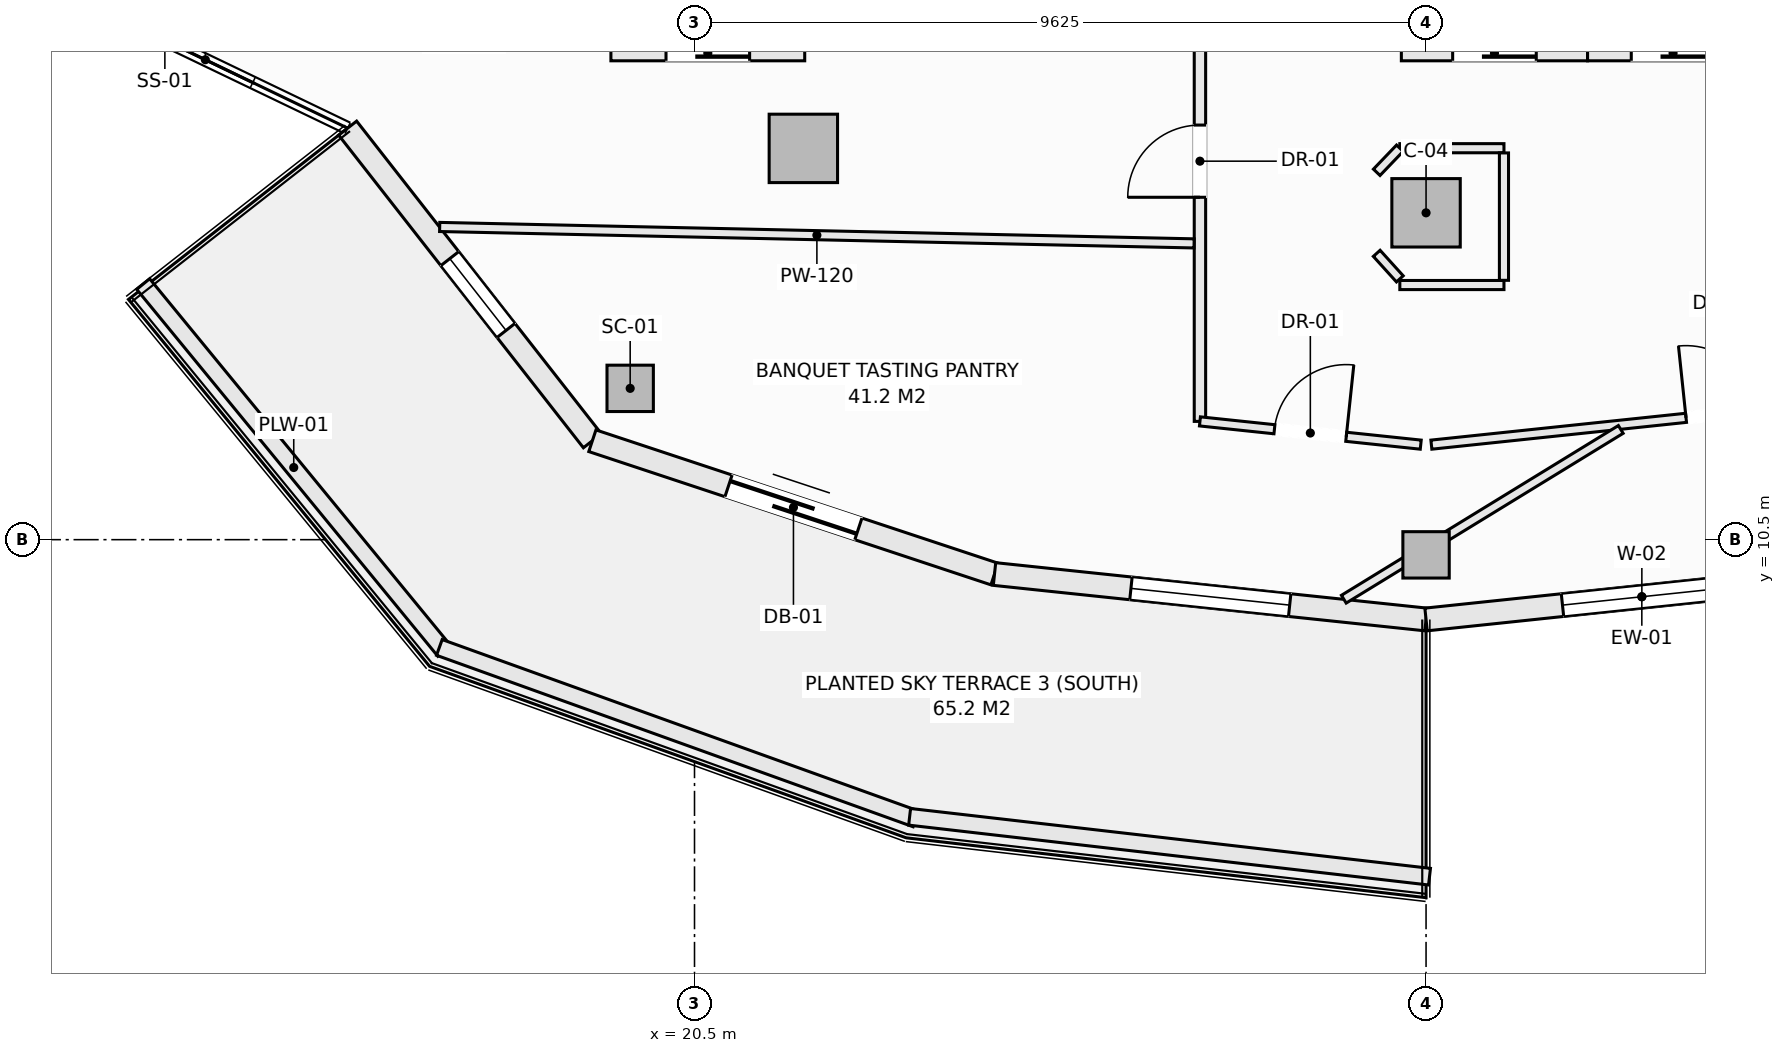
"""IFC4 building model, lengths in metres.
Left out: names, types, materials, properties, quantities, classifications, styles, units other than length and angle.
Written with IfcOpenShell. Run it as: python <this file> out.ifc"""

import sys

from ifc_helpers import new_model, si_unit, direction, frame, frame_2d, origin, origin_2d, place, context, subcontext, project, spatial, rectangle, hollow_rectangle, extrude, element, fill, save


model = new_model("IFC4")
c1 = context("Model", 3, precision=1e-05, world=origin(), true_north=direction((0.0, 1.0)))
c2 = subcontext(c1, "Body", "Model", "MODEL_VIEW")
j1 = project(units=[si_unit("LENGTHUNIT", "METRE"), si_unit("PLANEANGLEUNIT", "RADIAN")], contexts=[c1])
p1 = place(None, origin())
s1 = spatial("IfcSite", under=j1, at=p1, CompositionType="ELEMENT")
p2 = place(p1, origin())
s2 = spatial("IfcBuilding", under=s1, at=p2, CompositionType="ELEMENT")
p3 = place(p2, frame((0.0, 0.0, 149.5)))
s3 = spatial("IfcBuildingStorey", under=s2, at=p3, CompositionType="ELEMENT", Elevation=149.5)
for number, where, z_axis, x_axis in (
    (1, (19.654, 12.49, -0.27), (0.0, 0.0, 1.0), (1.0, 0.0, 0.0)),
    (2, (30.125, 10.3, -0.27), (0.0, 0.0, 1.0), (1.0, 0.0, 0.0)),
):
    element("IfcColumn", number, at=place(p3, frame(where, z_axis=z_axis, x_axis=x_axis)), inside=s3, PredefinedType="COLUMN", context=c2, shape_type="SweptSolid", body=[
        extrude(hollow_rectangle(XDim=0.61, YDim=0.61, WallThickness=0.025, at=origin_2d()), origin(), (0.0, 0.0, 1.0), 3.4),
    ])
for number, where, z_axis, x_axis in (
    (3, (21.932, 15.648, -0.27), (0.0, 0.0, 1.0), (1.0, 0.0, 0.0)),
    (4, (30.125, 14.8, -0.27), (0.0, 0.0, 1.0), (1.0, 0.0, 0.0)),
):
    element("IfcColumn", number, at=place(p3, frame(where, z_axis=z_axis, x_axis=x_axis)), inside=s3, PredefinedType="COLUMN", context=c2, shape_type="SweptSolid", body=[
        extrude(rectangle(XDim=0.9, YDim=0.9, at=origin_2d()), origin(), (0.0, 0.0, 1.0), 3.4),
    ])
p4 = place(p3, frame((15.937, 15.914, 0.0), z_axis=(0.0, 0.0, 1.0), x_axis=(0.616429245738, -0.787410302828, 0.0)))
e5 = element("IfcWall", 5, at=p4, inside=s3, PredefinedType="SOLIDWALL", context=c2, shape_type="SweptSolid", body=[
    extrude(rectangle(XDim=5.223, YDim=0.3, at=frame_2d((2.612, 0.0))), origin(), (0.0, 0.0, 1.0), 2.653),
])
p5 = place(p4, frame((2.18, 0.0, 0.72)))
e6 = element("IfcOpeningElement", 6, at=p5, cuts=e5, PredefinedType="OPENING", context=c2, shape_type="SweptSolid", body=[
    extrude(rectangle(XDim=1.2, YDim=1.65, at=frame_2d((0.6, 0.825))), frame((0.0, 0.16, 0.0), z_axis=(0.0, -1.0, 0.0), x_axis=(1.0, 0.0, 0.0)), (0.0, 0.0, 1.0), 0.32),
])
p6 = place(p3, frame((19.156, 11.801, 0.0), z_axis=(0.0, 0.0, 1.0), x_axis=(0.949246811547, -0.314532177636, 0.0)))
e7 = element("IfcWall", 7, at=p6, inside=s3, PredefinedType="SOLIDWALL", context=c2, shape_type="SweptSolid", body=[
    extrude(rectangle(XDim=5.574, YDim=0.3, at=frame_2d((2.787, 0.0))), origin(), (0.0, 0.0, 1.0), 2.653),
])
p7 = place(p6, frame((1.887, 0.0, 0.0)))
e8 = element("IfcOpeningElement", 8, at=p7, cuts=e7, PredefinedType="OPENING", context=c2, shape_type="SweptSolid", body=[
    extrude(rectangle(XDim=1.8, YDim=2.25, at=frame_2d((0.9, 1.125))), frame((0.0, 0.16, 0.0), z_axis=(0.0, -1.0, 0.0), x_axis=(1.0, 0.0, 0.0)), (0.0, 0.0, 1.0), 0.32),
])
p8 = place(p3, frame((24.447, 10.048, 0.0), z_axis=(0.0, 0.0, 1.0), x_axis=(0.994496545245, -0.104769372887, 0.0)))
e9 = element("IfcWall", 9, at=p8, inside=s3, PredefinedType="SOLIDWALL", context=c2, shape_type="SweptSolid", body=[
    extrude(rectangle(XDim=5.709, YDim=0.3, at=frame_2d((2.854, 0.0))), origin(), (0.0, 0.0, 1.0), 2.653),
])
p9 = place(p8, frame((1.805, 0.0, 0.74)))
e10 = element("IfcOpeningElement", 10, at=p9, cuts=e9, PredefinedType="OPENING", context=c2, shape_type="SweptSolid", body=[
    extrude(rectangle(XDim=2.1, YDim=1.7, at=frame_2d((1.05, 0.85))), frame((0.0, 0.16, 0.0), z_axis=(0.0, -1.0, 0.0), x_axis=(1.0, 0.0, 0.0)), (0.0, 0.0, 1.0), 0.32),
])
p10 = place(p3, frame((30.125, 9.45, 0.0), z_axis=(0.0, 0.0, 1.0), x_axis=(0.994496545245, 0.104769372887, 0.0)))
e11 = element("IfcWall", 11, at=p10, inside=s3, PredefinedType="SOLIDWALL", context=c2, shape_type="SweptSolid", body=[
    extrude(rectangle(XDim=5.709, YDim=0.3, at=frame_2d((2.854, 0.0))), origin(), (0.0, 0.0, 1.0), 2.653),
])
p11 = place(p10, frame((1.805, 0.0, 0.74)))
e12 = element("IfcOpeningElement", 12, at=p11, cuts=e11, PredefinedType="OPENING", context=c2, shape_type="SweptSolid", body=[
    extrude(rectangle(XDim=2.1, YDim=1.7, at=frame_2d((1.05, 0.85))), frame((0.0, 0.16, 0.0), z_axis=(0.0, -1.0, 0.0), x_axis=(1.0, 0.0, 0.0)), (0.0, 0.0, 1.0), 0.32),
])
p12 = place(p3, frame((13.246, 13.863, 0.0), z_axis=(0.0, 0.0, 1.0), x_axis=(0.634429234628, -0.77298094818, 0.0)))
e13 = element("IfcWall", 13, at=p12, inside=s3, PredefinedType="PARAPET", context=c2, shape_type="SweptSolid", body=[
    extrude(rectangle(XDim=6.245, YDim=0.22, at=frame_2d((3.123, 0.0))), origin(), (0.0, 0.0, 1.0), 0.52),
])
p13 = place(p3, frame((17.143, 9.082, 0.0), z_axis=(0.0, 0.0, 1.0), x_axis=(0.940948576924, -0.338549517184, 0.0)))
e14 = element("IfcWall", 14, at=p13, inside=s3, PredefinedType="PARAPET", context=c2, shape_type="SweptSolid", body=[
    extrude(rectangle(XDim=6.664, YDim=0.22, at=frame_2d((3.332, 0.0))), origin(), (0.0, 0.0, 1.0), 0.52),
])
p14 = place(p3, frame((23.33, 6.854, 0.0), z_axis=(0.0, 0.0, 1.0), x_axis=(0.993440576506, -0.114349555972, 0.0)))
e15 = element("IfcWall", 15, at=p14, inside=s3, PredefinedType="PARAPET", context=c2, shape_type="SweptSolid", body=[
    extrude(rectangle(XDim=6.885, YDim=0.22, at=frame_2d((3.443, 0.0))), origin(), (0.0, 0.0, 1.0), 0.52),
])
p15 = place(p3, frame((19.4, 16.9, 0.0), z_axis=(0.0, 0.0, 1.0), x_axis=(1.0, 0.0, 0.0)))
e16 = element("IfcWall", 16, at=p15, inside=s3, PredefinedType="SOLIDWALL", context=c2, shape_type="SweptSolid", body=[
    extrude(rectangle(XDim=2.55, YDim=0.2, at=frame_2d((1.275, 0.0))), origin(), (0.0, 0.0, 1.0), 3.13),
])
p16 = place(p15, frame((0.725, 0.0, 0.0)))
e17 = element("IfcOpeningElement", 17, at=p16, cuts=e16, PredefinedType="OPENING", context=c2, shape_type="SweptSolid", body=[
    extrude(rectangle(XDim=1.1, YDim=2.2, at=frame_2d((0.55, 1.1))), frame((0.0, 0.11, 0.0), z_axis=(0.0, -1.0, 0.0), x_axis=(1.0, 0.0, 0.0)), (0.0, 0.0, 1.0), 0.22),
])
p17 = place(p3, frame((29.8, 16.9, 0.0), z_axis=(0.0, 0.0, 1.0), x_axis=(1.0, 0.0, 0.0)))
e18 = element("IfcWall", 18, at=p17, inside=s3, PredefinedType="SOLIDWALL", context=c2, shape_type="SweptSolid", body=[
    extrude(rectangle(XDim=2.45, YDim=0.2, at=frame_2d((1.225, 0.0))), origin(), (0.0, 0.0, 1.0), 3.13),
])
p18 = place(p17, frame((0.675, 0.0, 0.0)))
e19 = element("IfcOpeningElement", 19, at=p18, cuts=e18, PredefinedType="OPENING", context=c2, shape_type="SweptSolid", body=[
    extrude(rectangle(XDim=1.1, YDim=2.2, at=frame_2d((0.55, 1.1))), frame((0.0, 0.11, 0.0), z_axis=(0.0, -1.0, 0.0), x_axis=(1.0, 0.0, 0.0)), (0.0, 0.0, 1.0), 0.22),
])
p19 = place(p3, frame((32.25, 16.9, 0.0), z_axis=(0.0, 0.0, 1.0), x_axis=(1.0, 0.0, 0.0)))
e20 = element("IfcWall", 20, at=p19, inside=s3, PredefinedType="SOLIDWALL", context=c2, shape_type="SweptSolid", body=[
    extrude(rectangle(XDim=2.25, YDim=0.2, at=frame_2d((1.125, 0.0))), origin(), (0.0, 0.0, 1.0), 3.13),
])
p20 = place(p19, frame((0.575, 0.0, 0.0)))
e21 = element("IfcOpeningElement", 21, at=p20, cuts=e20, PredefinedType="OPENING", context=c2, shape_type="SweptSolid", body=[
    extrude(rectangle(XDim=1.1, YDim=2.2, at=frame_2d((0.55, 1.1))), frame((0.0, 0.11, 0.0), z_axis=(0.0, -1.0, 0.0), x_axis=(1.0, 0.0, 0.0)), (0.0, 0.0, 1.0), 0.22),
])
p21 = place(p3, frame((27.15, 12.056, 0.0), z_axis=(0.0, 0.0, 1.0), x_axis=(0.0, 1.0, 0.0)))
e22 = element("IfcWall", 22, at=p21, inside=s3, PredefinedType="PARTITIONING", context=c2, shape_type="SweptSolid", body=[
    extrude(rectangle(XDim=4.917, YDim=0.15, at=frame_2d((2.458, 0.0))), origin(), (0.0, 0.0, 1.0), 3.13),
])
p22 = place(p21, frame((2.948, 0.0, 0.0)))
e23 = element("IfcOpeningElement", 23, at=p22, cuts=e22, PredefinedType="OPENING", context=c2, shape_type="SweptSolid", body=[
    extrude(rectangle(XDim=0.95, YDim=2.1, at=frame_2d((0.475, 1.05))), frame((0.0, 0.085, 0.0), z_axis=(0.0, -1.0, 0.0), x_axis=(1.0, 0.0, 0.0)), (0.0, 0.0, 1.0), 0.17),
])
p23 = place(p3, frame((29.78, 15.65, 0.0), z_axis=(0.0, 0.0, 1.0), x_axis=(1.0, 0.0, 0.0)))
e24 = element("IfcWall", 24, at=p23, inside=s3, PredefinedType="PARTITIONING", context=c2, shape_type="SweptSolid", body=[
    extrude(rectangle(XDim=1.37, YDim=0.12, at=frame_2d((0.685, 0.0))), origin(), (0.0, 0.0, 1.0), 3.13),
])
p24 = place(p3, frame((30.195, 11.75, 0.0), z_axis=(0.0, 0.0, 1.0), x_axis=(0.994502215954, 0.104715531139, 0.0)))
e25 = element("IfcWall", 25, at=p24, inside=s3, PredefinedType="PARTITIONING", context=c2, shape_type="SweptSolid", body=[
    extrude(rectangle(XDim=5.787, YDim=0.12, at=frame_2d((2.893, 0.0))), origin(), (0.0, 0.0, 1.0), 3.13),
])
p25 = place(p24, frame((3.369, 0.0, 0.0)))
e26 = element("IfcOpeningElement", 26, at=p25, cuts=e25, PredefinedType="OPENING", context=c2, shape_type="SweptSolid", body=[
    extrude(rectangle(XDim=0.95, YDim=2.1, at=frame_2d((0.475, 1.05))), frame((0.0, 0.07, 0.0), z_axis=(0.0, -1.0, 0.0), x_axis=(1.0, 0.0, 0.0)), (0.0, 0.0, 1.0), 0.14),
])
p26 = place(p3, frame((27.15, 12.056, 0.0), z_axis=(0.0, 0.0, 1.0), x_axis=(0.994501330468, -0.104723940422, 0.0)))
e27 = element("IfcWall", 27, at=p26, inside=s3, PredefinedType="PARTITIONING", context=c2, shape_type="SweptSolid", body=[
    extrude(rectangle(XDim=2.921, YDim=0.12, at=frame_2d((1.46, 0.0))), origin(), (0.0, 0.0, 1.0), 3.13),
])
p27 = place(p26, frame((0.986, 0.0, 0.0)))
e28 = element("IfcOpeningElement", 28, at=p27, cuts=e27, PredefinedType="OPENING", context=c2, shape_type="SweptSolid", body=[
    extrude(rectangle(XDim=0.95, YDim=2.1, at=frame_2d((0.475, 1.05))), frame((0.0, 0.07, 0.0), z_axis=(0.0, -1.0, 0.0), x_axis=(1.0, 0.0, 0.0)), (0.0, 0.0, 1.0), 0.14),
])
p28 = place(p3, frame((29.476, 15.333, 0.0), z_axis=(0.0, 0.0, 1.0), x_axis=(0.692219273951, 0.721687243043, 0.0)))
e29 = element("IfcWall", 29, at=p28, inside=s3, PredefinedType="PARTITIONING", context=c2, shape_type="SweptSolid", body=[
    extrude(rectangle(XDim=0.439, YDim=0.12, at=frame_2d((0.22, 0.0))), origin(), (0.0, 0.0, 1.0), 3.13),
])
p29 = place(p3, frame((29.476, 14.267, 0.0), z_axis=(0.0, 0.0, 1.0), x_axis=(0.670659392016, -0.741765448037, 0.0)))
e30 = element("IfcWall", 30, at=p29, inside=s3, PredefinedType="PARTITIONING", context=c2, shape_type="SweptSolid", body=[
    extrude(rectangle(XDim=0.453, YDim=0.12, at=frame_2d((0.227, 0.0))), origin(), (0.0, 0.0, 1.0), 3.13),
])
p30 = place(p3, frame((29.78, 13.85, 0.0), z_axis=(0.0, 0.0, 1.0), x_axis=(1.0, 0.0, 0.0)))
e31 = element("IfcWall", 31, at=p30, inside=s3, PredefinedType="PARTITIONING", context=c2, shape_type="SweptSolid", body=[
    extrude(rectangle(XDim=1.37, YDim=0.12, at=frame_2d((0.685, 0.0))), origin(), (0.0, 0.0, 1.0), 3.13),
])
p31 = place(p3, frame((31.15, 13.912, 0.0), z_axis=(0.0, 0.0, 1.0), x_axis=(0.0, 1.0, 0.0)))
e32 = element("IfcWall", 32, at=p31, inside=s3, PredefinedType="PARTITIONING", context=c2, shape_type="SweptSolid", body=[
    extrude(rectangle(XDim=1.676, YDim=0.12, at=frame_2d((0.838, 0.0))), origin(), (0.0, 0.0, 1.0), 3.13),
])
p32 = place(p3, frame((17.147, 14.614, 0.0), z_axis=(0.0, 0.0, 1.0), x_axis=(0.99976262581, -0.021787428337, 0.0)))
e33 = element("IfcWall", 33, at=p32, inside=s3, PredefinedType="PARTITIONING", context=c2, shape_type="SweptSolid", body=[
    extrude(rectangle(XDim=9.928, YDim=0.12, at=frame_2d((4.964, 0.0))), origin(), (0.0, 0.0, 1.0), 2.653),
])
p33 = place(p3, frame((29.043, 9.717, 0.0), z_axis=(0.0, 0.0, 1.0), x_axis=(0.85263162776, 0.522512494916, 0.0)))
e34 = element("IfcWall", 34, at=p33, inside=s3, PredefinedType="PARTITIONING", context=c2, shape_type="SweptSolid", body=[
    extrude(rectangle(XDim=4.274, YDim=0.12, at=frame_2d((2.137, 0.0))), origin(), (0.0, 0.0, 1.0), 2.653),
])
p34 = place(p5, origin())
e35 = element("IfcWindow", 35, at=p34, inside=s3, PartitioningType="SINGLE_PANEL", PredefinedType="WINDOW", context=c2, shape_type="SweptSolid", body=[
    extrude(rectangle(XDim=1.2, YDim=1.65, at=frame_2d((0.6, 0.825))), frame((0.0, 0.03, 0.0), z_axis=(0.0, -1.0, 0.0), x_axis=(1.0, 0.0, 0.0)), (0.0, 0.0, 1.0), 0.06),
])
fill(e6, e35)
p35 = place(p7, frame((1.8, 0.0, 0.0), z_axis=(0.0, 0.0, 1.0), x_axis=(-1.0, 0.0, 0.0)))
e36 = element("IfcDoor", 36, at=p35, inside=s3, OperationType="SLIDING_TO_LEFT", PredefinedType="DOOR", context=c2, shape_type="SweptSolid", body=[
    extrude(rectangle(XDim=1.8, YDim=2.25, at=frame_2d((0.9, 1.125))), frame((0.0, 0.025, 0.0), z_axis=(0.0, -1.0, 0.0), x_axis=(1.0, 0.0, 0.0)), (0.0, 0.0, 1.0), 0.05),
])
fill(e8, e36)
p36 = place(p9, origin())
e37 = element("IfcWindow", 37, at=p36, inside=s3, PartitioningType="SINGLE_PANEL", PredefinedType="WINDOW", context=c2, shape_type="SweptSolid", body=[
    extrude(rectangle(XDim=2.1, YDim=1.7, at=frame_2d((1.05, 0.85))), frame((0.0, 0.03, 0.0), z_axis=(0.0, -1.0, 0.0), x_axis=(1.0, 0.0, 0.0)), (0.0, 0.0, 1.0), 0.06),
])
fill(e10, e37)
p37 = place(p11, origin())
e38 = element("IfcWindow", 38, at=p37, inside=s3, PartitioningType="SINGLE_PANEL", PredefinedType="WINDOW", context=c2, shape_type="SweptSolid", body=[
    extrude(rectangle(XDim=2.1, YDim=1.7, at=frame_2d((1.05, 0.85))), frame((0.0, 0.03, 0.0), z_axis=(0.0, -1.0, 0.0), x_axis=(1.0, 0.0, 0.0)), (0.0, 0.0, 1.0), 0.06),
])
fill(e12, e38)
p38 = place(p16, origin())
e39 = element("IfcDoor", 39, at=p38, inside=s3, OperationType="SLIDING_TO_LEFT", PredefinedType="DOOR", context=c2, shape_type="SweptSolid", body=[
    extrude(rectangle(XDim=1.1, YDim=2.2, at=frame_2d((0.55, 1.1))), frame((0.0, 0.025, 0.0), z_axis=(0.0, -1.0, 0.0), x_axis=(1.0, 0.0, 0.0)), (0.0, 0.0, 1.0), 0.05),
])
fill(e17, e39)
p39 = place(p18, origin())
e40 = element("IfcDoor", 40, at=p39, inside=s3, OperationType="SLIDING_TO_LEFT", PredefinedType="DOOR", context=c2, shape_type="SweptSolid", body=[
    extrude(rectangle(XDim=1.1, YDim=2.2, at=frame_2d((0.55, 1.1))), frame((0.0, 0.025, 0.0), z_axis=(0.0, -1.0, 0.0), x_axis=(1.0, 0.0, 0.0)), (0.0, 0.0, 1.0), 0.05),
])
fill(e19, e40)
p40 = place(p20, origin())
e41 = element("IfcDoor", 41, at=p40, inside=s3, OperationType="SLIDING_TO_LEFT", PredefinedType="DOOR", context=c2, shape_type="SweptSolid", body=[
    extrude(rectangle(XDim=1.1, YDim=2.2, at=frame_2d((0.55, 1.1))), frame((0.0, 0.025, 0.0), z_axis=(0.0, -1.0, 0.0), x_axis=(1.0, 0.0, 0.0)), (0.0, 0.0, 1.0), 0.05),
])
fill(e21, e41)
p41 = place(p22, origin())
e42 = element("IfcDoor", 42, at=p41, inside=s3, OperationType="SINGLE_SWING_LEFT", PredefinedType="DOOR", context=c2, shape_type="SweptSolid", body=[
    extrude(rectangle(XDim=0.95, YDim=2.1, at=frame_2d((0.475, 1.05))), frame((0.0, 0.025, 0.0), z_axis=(0.0, -1.0, 0.0), x_axis=(1.0, 0.0, 0.0)), (0.0, 0.0, 1.0), 0.05),
])
fill(e23, e42)
p42 = place(p27, origin())
e43 = element("IfcDoor", 43, at=p42, inside=s3, OperationType="SINGLE_SWING_RIGHT", PredefinedType="DOOR", context=c2, shape_type="SweptSolid", body=[
    extrude(rectangle(XDim=0.95, YDim=2.1, at=frame_2d((0.475, 1.05))), frame((0.0, 0.025, 0.0), z_axis=(0.0, -1.0, 0.0), x_axis=(1.0, 0.0, 0.0)), (0.0, 0.0, 1.0), 0.05),
])
fill(e28, e43)
p43 = place(p25, origin())
e44 = element("IfcDoor", 44, at=p43, inside=s3, OperationType="SINGLE_SWING_LEFT", PredefinedType="DOOR", context=c2, shape_type="SweptSolid", body=[
    extrude(rectangle(XDim=0.95, YDim=2.1, at=frame_2d((0.475, 1.05))), frame((0.0, 0.025, 0.0), z_axis=(0.0, -1.0, 0.0), x_axis=(1.0, 0.0, 0.0)), (0.0, 0.0, 1.0), 0.05),
])
fill(e26, e44)
save(model, sys.argv[1])
